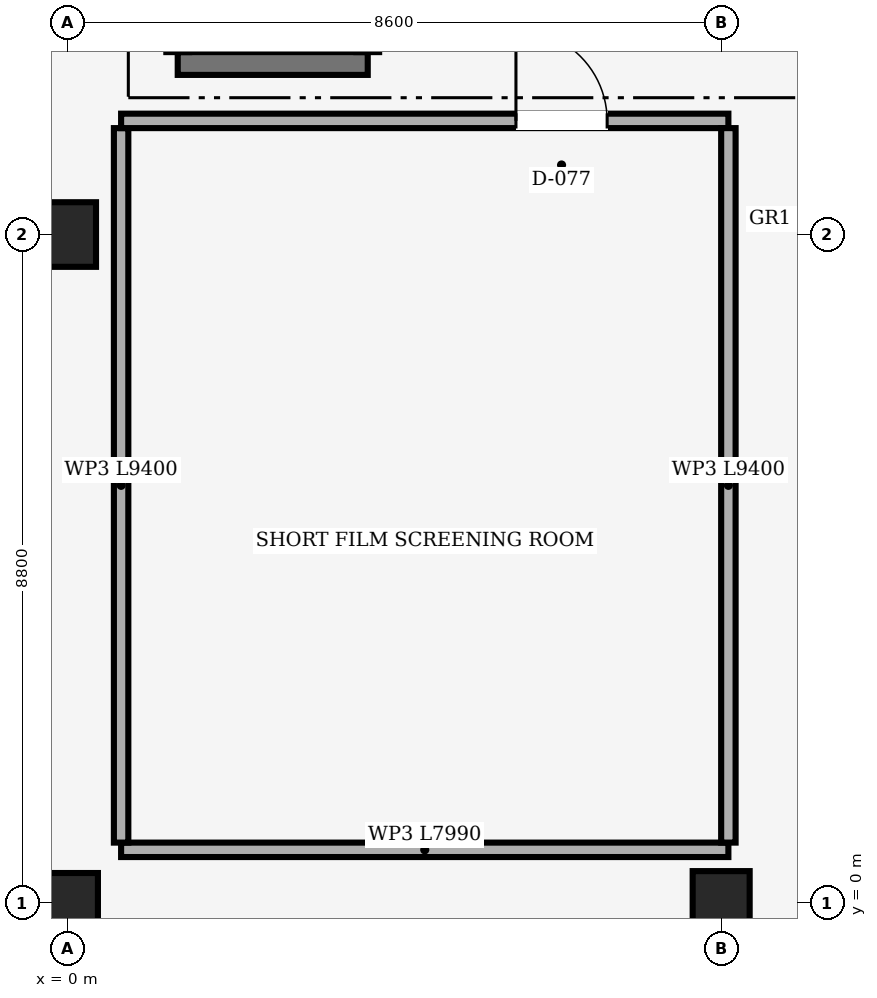
"""IFC4 building model, lengths in metres.
Left out: names, types, materials, properties, quantities, classifications, styles, units other than length and angle.
Written with IfcOpenShell. Run it as: python <this file> out.ifc"""

import sys

from ifc_helpers import new_model, si_unit, direction, frame, frame_2d, origin, origin_with_axes, origin_2d, place, context, subcontext, project, spatial, rectangle, extrude, element, fill, save


model = new_model("IFC4")
c1 = context("Model", 3, precision=1e-05, world=origin(), true_north=direction((0.0, 1.0)))
c2 = subcontext(c1, "Body", "Model", "MODEL_VIEW")
j1 = project(units=[si_unit("LENGTHUNIT", "METRE"), si_unit("PLANEANGLEUNIT", "RADIAN")], contexts=[c1])
p1 = place(None, origin())
s1 = spatial("IfcSite", under=j1, at=p1, CompositionType="ELEMENT")
p2 = place(p1, origin())
s2 = spatial("IfcBuilding", under=s1, at=p2, CompositionType="ELEMENT")
p3 = place(p2, frame((0.0, 0.0, 8.4)))
s3 = spatial("IfcBuildingStorey", under=s2, at=p3, CompositionType="ELEMENT", Elevation=8.4)
p4 = place(p3, origin_with_axes())
e1 = element("IfcColumn", 1, at=p4, inside=s3, PredefinedType="COLUMN", context=c2, shape_type="SweptSolid", body=[
    extrude(rectangle(XDim=0.8, YDim=0.8, at=origin_2d()), origin(), (0.0, 0.0, 1.0), 3.34),
])
for number, where, z_axis, x_axis in (
    (2, (0.0, 8.8, 0.0), (0.0, 0.0, 1.0), (1.0, 0.0, 0.0)),
    (3, (8.6, 0.0, 0.0), (0.0, 0.0, 1.0), (1.0, 0.0, 0.0)),
):
    element("IfcColumn", number, at=place(p3, frame(where, z_axis=z_axis, x_axis=x_axis)), inside=s3, PredefinedType="COLUMN", context=c2, shape_type="SweptSolid", body=[
        extrude(rectangle(XDim=0.75, YDim=0.85, at=origin_2d()), origin(), (0.0, 0.0, 1.0), 3.34),
    ])
p5 = place(p3, frame((3.95, 11.05, 0.0), z_axis=(0.0, 0.0, 1.0), x_axis=(-1.0, 0.0, 0.0)))
e4 = element("IfcWall", 4, at=p5, inside=s3, PredefinedType="SHEAR", context=c2, shape_type="SweptSolid", body=[
    extrude(rectangle(XDim=2.5, YDim=0.3, at=frame_2d((1.25, 0.0))), origin(), (0.0, 0.0, 1.0), 3.34),
])
p6 = place(p3, frame((3.95, 14.1, 0.0), z_axis=(0.0, 0.0, 1.0), x_axis=(0.0, -1.0, 0.0)))
e5 = element("IfcWall", 5, at=p6, inside=s3, PredefinedType="SHEAR", context=c2, shape_type="SweptSolid", body=[
    extrude(rectangle(XDim=2.9, YDim=0.3, at=frame_2d((1.45, 0.0))), origin(), (0.0, 0.0, 1.0), 3.34),
])
p7 = place(p3, frame((8.695, 0.705, 0.0), z_axis=(0.0, 0.0, 1.0), x_axis=(-1.0, 0.0, 0.0)))
e6 = element("IfcWall", 6, at=p7, inside=s3, PredefinedType="PARTITIONING", context=c2, shape_type="SweptSolid", body=[
    extrude(rectangle(XDim=7.99, YDim=0.19, at=frame_2d((3.995, 0.0))), origin(), (0.0, 0.0, 1.0), 3.32),
])
p8 = place(p3, frame((0.705, 0.8, 0.0), z_axis=(0.0, 0.0, 1.0), x_axis=(0.0, 1.0, 0.0)))
e7 = element("IfcWall", 7, at=p8, inside=s3, PredefinedType="PARTITIONING", context=c2, shape_type="SweptSolid", body=[
    extrude(rectangle(XDim=9.4, YDim=0.19, at=frame_2d((4.7, 0.0))), origin(), (0.0, 0.0, 1.0), 3.32),
])
p9 = place(p3, frame((0.705, 10.295, 0.0), z_axis=(0.0, 0.0, 1.0), x_axis=(1.0, 0.0, 0.0)))
e8 = element("IfcWall", 8, at=p9, inside=s3, PredefinedType="PARTITIONING", context=c2, shape_type="SweptSolid", body=[
    extrude(rectangle(XDim=7.99, YDim=0.19, at=frame_2d((3.995, 0.0))), origin(), (0.0, 0.0, 1.0), 3.32),
])
p10 = place(p9, frame((5.195, 0.0, 0.0)))
e9 = element("IfcOpeningElement", 9, at=p10, cuts=e8, PredefinedType="OPENING", context=c2, shape_type="SweptSolid", body=[
    extrude(rectangle(XDim=1.2, YDim=2.15, at=frame_2d((0.6, 1.075))), frame((0.0, 0.095, 0.0), z_axis=(0.0, -1.0, 0.0), x_axis=(1.0, 0.0, 0.0)), (0.0, 0.0, 1.0), 0.19),
])
p11 = place(p3, frame((8.695, 10.2, 0.0), z_axis=(0.0, 0.0, 1.0), x_axis=(0.0, -1.0, 0.0)))
e10 = element("IfcWall", 10, at=p11, inside=s3, PredefinedType="PARTITIONING", context=c2, shape_type="SweptSolid", body=[
    extrude(rectangle(XDim=9.4, YDim=0.19, at=frame_2d((4.7, 0.0))), origin(), (0.0, 0.0, 1.0), 2.62),
])
p12 = place(p10, origin())
e11 = element("IfcDoor", 11, at=p12, inside=s3, OperationType="SINGLE_SWING_LEFT", PredefinedType="DOOR", context=c2, shape_type="SweptSolid", body=[
    extrude(rectangle(XDim=1.2, YDim=2.15, at=frame_2d((0.6, 1.075))), frame((0.0, 0.025, 0.0), z_axis=(0.0, -1.0, 0.0), x_axis=(1.0, 0.0, 0.0)), (0.0, 0.0, 1.0), 0.05),
])
fill(e9, e11)
save(model, sys.argv[1])
